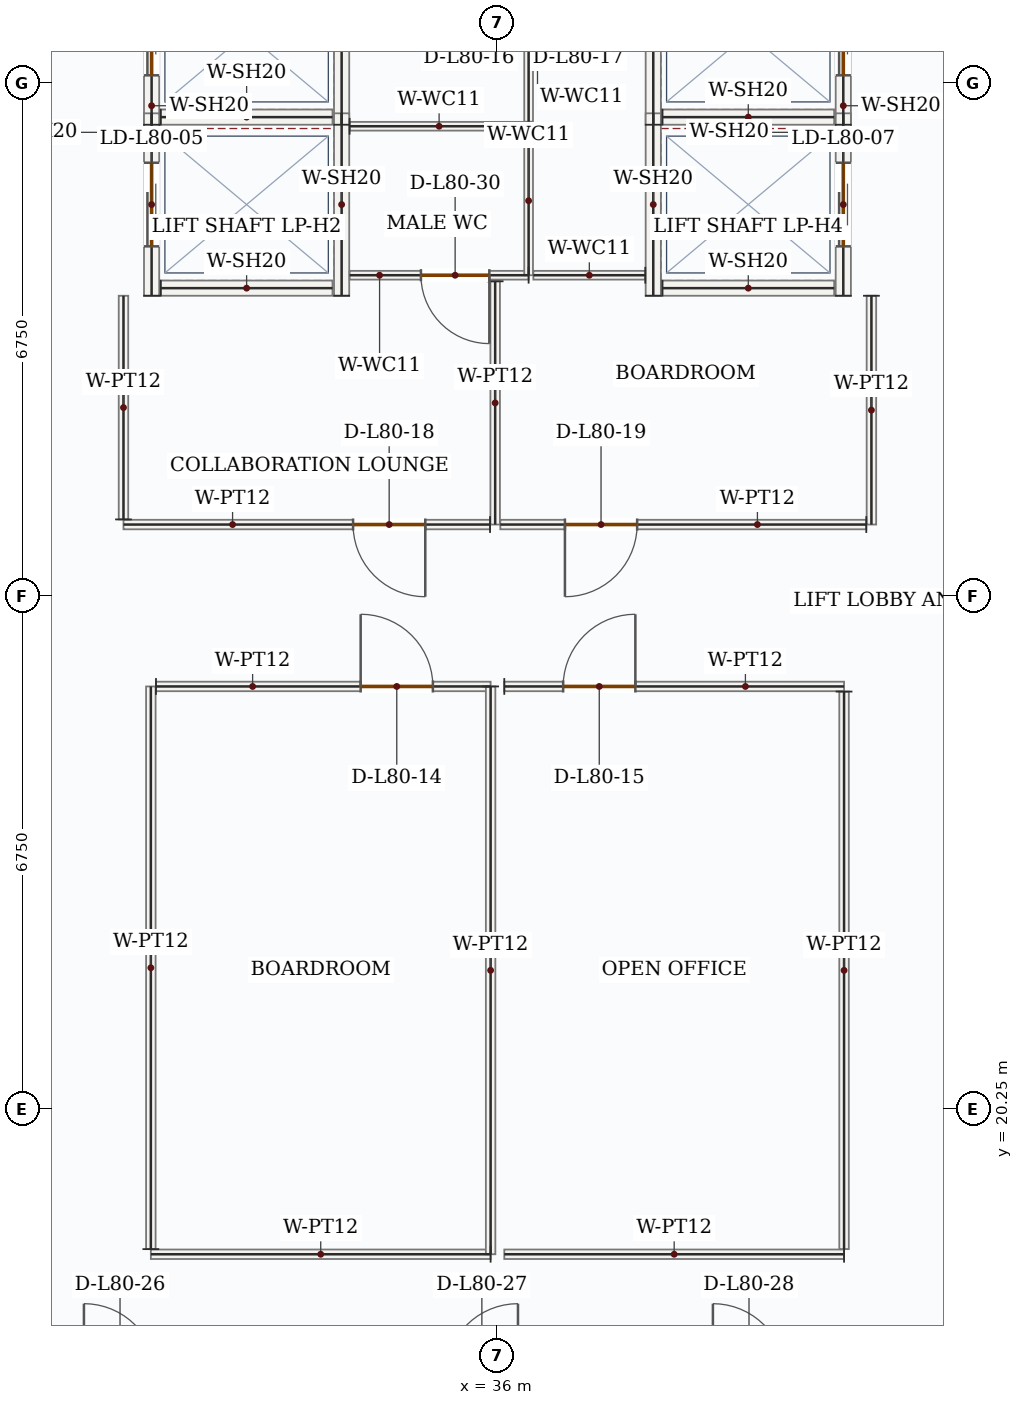
"""IFC4 building model, lengths in metres.
Left out: names, types, materials, properties, quantities, classifications, styles, units other than length and angle.
Written with IfcOpenShell. Run it as: python <this file> out.ifc"""

import sys

from ifc_helpers import new_model, si_unit, direction, frame, frame_2d, origin, place, context, subcontext, project, spatial, rectangle, extrude, source, transform, mapped, element, fill, save


model = new_model("IFC4")
c1 = context("Model", 3, precision=1e-05, world=origin(), true_north=direction((0.0, 1.0)))
c2 = subcontext(c1, "Body", "Model", "MODEL_VIEW")
j1 = project(units=[si_unit("LENGTHUNIT", "METRE"), si_unit("PLANEANGLEUNIT", "RADIAN")], contexts=[c1])
p1 = place(None, origin())
s1 = spatial("IfcSite", under=j1, at=p1, CompositionType="ELEMENT")
p2 = place(p1, origin())
s2 = spatial("IfcBuilding", under=s1, at=p2, CompositionType="ELEMENT")
p3 = place(p2, frame((0.0, 0.0, 331.05)))
s3 = spatial("IfcBuildingStorey", under=s2, at=p3, CompositionType="ELEMENT", Elevation=331.05)
p4 = place(p3, frame((31.45, 33.2, 0.0), z_axis=(0.0, 0.0, 1.0), x_axis=(0.0, 1.0, 0.0)))
e1 = element("IfcWall", 1, at=p4, inside=s3, PredefinedType="SOLIDWALL", context=c2, shape_type="SweptSolid", body=[
    extrude(rectangle(XDim=2.4, YDim=0.2, at=frame_2d((1.2, 0.0))), origin(), (0.0, 0.0, 1.0), 3.5),
])
p5 = place(p4, frame((0.65, 0.0, 0.0)))
e2 = element("IfcOpeningElement", 2, at=p5, cuts=e1, PredefinedType="OPENING", context=c2, shape_type="SweptSolid", body=[
    extrude(rectangle(XDim=1.1, YDim=2.15, at=frame_2d((0.55, 1.075))), frame((0.0, 0.11, 0.0), z_axis=(0.0, -1.0, 0.0), x_axis=(1.0, 0.0, 0.0)), (0.0, 0.0, 1.0), 0.22),
])
m1 = source(origin(), c2, "Body", "SweptSolid", [
    extrude(rectangle(XDim=2.4, YDim=0.2, at=frame_2d((1.2, 0.0))), origin(), (0.0, 0.0, 1.0), 3.5),
])
p6 = place(p3, frame((33.95, 33.2, 0.0), z_axis=(0.0, 0.0, 1.0), x_axis=(0.0, 1.0, 0.0)))
e3 = element("IfcWall", 3, at=p6, inside=s3, PredefinedType="SOLIDWALL", context=c2, shape_type="MappedRepresentation", body=[
    mapped(m1, transform((0.0, 0.0, 0.0), x_axis=(1.0, 0.0, 0.0), y_axis=(0.0, 1.0, 0.0), z_axis=(0.0, 0.0, 1.0), scale=1.0)),
])
m2 = source(origin(), c2, "Body", "SweptSolid", [
    extrude(rectangle(XDim=2.26, YDim=0.2, at=frame_2d((1.13, 0.0))), origin(), (0.0, 0.0, 1.0), 3.5),
])
p7 = place(p3, frame((31.57, 33.3, 0.0), z_axis=(0.0, 0.0, 1.0), x_axis=(1.0, 0.0, 0.0)))
e4 = element("IfcWall", 4, at=p7, inside=s3, PredefinedType="SOLIDWALL", context=c2, shape_type="MappedRepresentation", body=[
    mapped(m2, transform((0.0, 0.0, 0.0), x_axis=(1.0, 0.0, 0.0), y_axis=(0.0, 1.0, 0.0), z_axis=(0.0, 0.0, 1.0), scale=1.0)),
])
p8 = place(p3, frame((31.45, 30.95, 0.0), z_axis=(0.0, 0.0, 1.0), x_axis=(0.0, 1.0, 0.0)))
e5 = element("IfcWall", 5, at=p8, inside=s3, PredefinedType="SOLIDWALL", context=c2, shape_type="SweptSolid", body=[
    extrude(rectangle(XDim=2.4, YDim=0.2, at=frame_2d((1.2, 0.0))), origin(), (0.0, 0.0, 1.0), 3.5),
])
p9 = place(p8, frame((0.65, 0.0, 0.0)))
e6 = element("IfcOpeningElement", 6, at=p9, cuts=e5, PredefinedType="OPENING", context=c2, shape_type="SweptSolid", body=[
    extrude(rectangle(XDim=1.1, YDim=2.15, at=frame_2d((0.55, 1.075))), frame((0.0, 0.11, 0.0), z_axis=(0.0, -1.0, 0.0), x_axis=(1.0, 0.0, 0.0)), (0.0, 0.0, 1.0), 0.22),
])
p10 = place(p3, frame((33.95, 30.95, 0.0), z_axis=(0.0, 0.0, 1.0), x_axis=(0.0, 1.0, 0.0)))
e7 = element("IfcWall", 7, at=p10, inside=s3, PredefinedType="SOLIDWALL", context=c2, shape_type="MappedRepresentation", body=[
    mapped(m1, transform((0.0, 0.0, 0.0), x_axis=(1.0, 0.0, 0.0), y_axis=(0.0, 1.0, 0.0), z_axis=(0.0, 0.0, 1.0), scale=1.0)),
])
p11 = place(p3, frame((31.57, 31.05, 0.0), z_axis=(0.0, 0.0, 1.0), x_axis=(1.0, 0.0, 0.0)))
e8 = element("IfcWall", 8, at=p11, inside=s3, PredefinedType="SOLIDWALL", context=c2, shape_type="MappedRepresentation", body=[
    mapped(m2, transform((0.0, 0.0, 0.0), x_axis=(1.0, 0.0, 0.0), y_axis=(0.0, 1.0, 0.0), z_axis=(0.0, 0.0, 1.0), scale=1.0)),
])
p12 = place(p3, frame((38.05, 33.2, 0.0), z_axis=(0.0, 0.0, 1.0), x_axis=(0.0, 1.0, 0.0)))
e9 = element("IfcWall", 9, at=p12, inside=s3, PredefinedType="SOLIDWALL", context=c2, shape_type="MappedRepresentation", body=[
    mapped(m1, transform((0.0, 0.0, 0.0), x_axis=(1.0, 0.0, 0.0), y_axis=(0.0, 1.0, 0.0), z_axis=(0.0, 0.0, 1.0), scale=1.0)),
])
p13 = place(p3, frame((40.55, 33.2, 0.0), z_axis=(0.0, 0.0, 1.0), x_axis=(0.0, 1.0, 0.0)))
e10 = element("IfcWall", 10, at=p13, inside=s3, PredefinedType="SOLIDWALL", context=c2, shape_type="SweptSolid", body=[
    extrude(rectangle(XDim=2.4, YDim=0.2, at=frame_2d((1.2, 0.0))), origin(), (0.0, 0.0, 1.0), 3.5),
])
p14 = place(p13, frame((0.65, 0.0, 0.0)))
e11 = element("IfcOpeningElement", 11, at=p14, cuts=e10, PredefinedType="OPENING", context=c2, shape_type="SweptSolid", body=[
    extrude(rectangle(XDim=1.1, YDim=2.15, at=frame_2d((0.55, 1.075))), frame((0.0, 0.11, 0.0), z_axis=(0.0, -1.0, 0.0), x_axis=(1.0, 0.0, 0.0)), (0.0, 0.0, 1.0), 0.22),
])
p15 = place(p3, frame((38.17, 33.3, 0.0), z_axis=(0.0, 0.0, 1.0), x_axis=(1.0, 0.0, 0.0)))
e12 = element("IfcWall", 12, at=p15, inside=s3, PredefinedType="SOLIDWALL", context=c2, shape_type="MappedRepresentation", body=[
    mapped(m2, transform((0.0, 0.0, 0.0), x_axis=(1.0, 0.0, 0.0), y_axis=(0.0, 1.0, 0.0), z_axis=(0.0, 0.0, 1.0), scale=1.0)),
])
p16 = place(p3, frame((38.05, 30.95, 0.0), z_axis=(0.0, 0.0, 1.0), x_axis=(0.0, 1.0, 0.0)))
e13 = element("IfcWall", 13, at=p16, inside=s3, PredefinedType="SOLIDWALL", context=c2, shape_type="MappedRepresentation", body=[
    mapped(m1, transform((0.0, 0.0, 0.0), x_axis=(1.0, 0.0, 0.0), y_axis=(0.0, 1.0, 0.0), z_axis=(0.0, 0.0, 1.0), scale=1.0)),
])
p17 = place(p3, frame((40.55, 30.95, 0.0), z_axis=(0.0, 0.0, 1.0), x_axis=(0.0, 1.0, 0.0)))
e14 = element("IfcWall", 14, at=p17, inside=s3, PredefinedType="SOLIDWALL", context=c2, shape_type="SweptSolid", body=[
    extrude(rectangle(XDim=2.4, YDim=0.2, at=frame_2d((1.2, 0.0))), origin(), (0.0, 0.0, 1.0), 3.5),
])
p18 = place(p17, frame((0.65, 0.0, 0.0)))
e15 = element("IfcOpeningElement", 15, at=p18, cuts=e14, PredefinedType="OPENING", context=c2, shape_type="SweptSolid", body=[
    extrude(rectangle(XDim=1.1, YDim=2.15, at=frame_2d((0.55, 1.075))), frame((0.0, 0.11, 0.0), z_axis=(0.0, -1.0, 0.0), x_axis=(1.0, 0.0, 0.0)), (0.0, 0.0, 1.0), 0.22),
])
p19 = place(p3, frame((38.17, 31.05, 0.0), z_axis=(0.0, 0.0, 1.0), x_axis=(1.0, 0.0, 0.0)))
e16 = element("IfcWall", 16, at=p19, inside=s3, PredefinedType="SOLIDWALL", context=c2, shape_type="MappedRepresentation", body=[
    mapped(m2, transform((0.0, 0.0, 0.0), x_axis=(1.0, 0.0, 0.0), y_axis=(0.0, 1.0, 0.0), z_axis=(0.0, 0.0, 1.0), scale=1.0)),
])
p20 = place(p3, frame((36.41, 31.22, 0.0), z_axis=(0.0, 0.0, 1.0), x_axis=(-1.0, 0.0, 0.0)))
e17 = element("IfcWall", 17, at=p20, inside=s3, PredefinedType="PARTITIONING", context=c2, shape_type="SweptSolid", body=[
    extrude(rectangle(XDim=2.355, YDim=0.115, at=frame_2d((1.177, 0.0))), origin(), (0.0, 0.0, 1.0), 3.5),
])
p21 = place(p20, frame((0.517, 0.0, 0.0)))
e18 = element("IfcOpeningElement", 18, at=p21, cuts=e17, PredefinedType="OPENING", context=c2, shape_type="SweptSolid", body=[
    extrude(rectangle(XDim=0.9, YDim=2.1, at=frame_2d((0.45, 1.05))), frame((0.0, 0.067, 0.0), z_axis=(0.0, -1.0, 0.0), x_axis=(1.0, 0.0, 0.0)), (0.0, 0.0, 1.0), 0.135),
])
m3 = source(origin(), c2, "Body", "SweptSolid", [
    extrude(rectangle(XDim=2.355, YDim=0.115, at=frame_2d((1.177, 0.0))), origin(), (0.0, 0.0, 1.0), 3.5),
])
p22 = place(p3, frame((34.055, 33.18, 0.0), z_axis=(0.0, 0.0, 1.0), x_axis=(1.0, 0.0, 0.0)))
e19 = element("IfcWall", 19, at=p22, inside=s3, PredefinedType="PARTITIONING", context=c2, shape_type="MappedRepresentation", body=[
    mapped(m3, transform((0.0, 0.0, 0.0), x_axis=(1.0, 0.0, 0.0), y_axis=(0.0, 1.0, 0.0), z_axis=(0.0, 0.0, 1.0), scale=1.0)),
])
m4 = source(origin(), c2, "Body", "SweptSolid", [
    extrude(rectangle(XDim=1.96, YDim=0.115, at=frame_2d((0.98, 0.0))), origin(), (0.0, 0.0, 1.0), 3.5),
])
p23 = place(p3, frame((36.41, 33.18, 0.0), z_axis=(0.0, 0.0, 1.0), x_axis=(0.0, -1.0, 0.0)))
e20 = element("IfcWall", 20, at=p23, inside=s3, PredefinedType="PARTITIONING", context=c2, shape_type="MappedRepresentation", body=[
    mapped(m4, transform((0.0, 0.0, 0.0), x_axis=(1.0, 0.0, 0.0), y_axis=(0.0, 1.0, 0.0), z_axis=(0.0, 0.0, 1.0), scale=1.0)),
])
m5 = source(origin(), c2, "Body", "SweptSolid", [
    extrude(rectangle(XDim=2.04, YDim=0.115, at=frame_2d((1.02, 0.0))), origin(), (0.0, 0.0, 1.0), 3.5),
])
p24 = place(p3, frame((36.41, 35.28, 0.0), z_axis=(0.0, 0.0, 1.0), x_axis=(0.0, -1.0, 0.0)))
e21 = element("IfcWall", 21, at=p24, inside=s3, PredefinedType="PARTITIONING", context=c2, shape_type="MappedRepresentation", body=[
    mapped(m5, transform((0.0, 0.0, 0.0), x_axis=(1.0, 0.0, 0.0), y_axis=(0.0, 1.0, 0.0), z_axis=(0.0, 0.0, 1.0), scale=1.0)),
])
m6 = source(origin(), c2, "Body", "SweptSolid", [
    extrude(rectangle(XDim=1.473, YDim=0.115, at=frame_2d((0.736, 0.0))), origin(), (0.0, 0.0, 1.0), 3.5),
])
p25 = place(p3, frame((37.945, 31.22, 0.0), z_axis=(0.0, 0.0, 1.0), x_axis=(-1.0, 0.0, 0.0)))
e22 = element("IfcWall", 22, at=p25, inside=s3, PredefinedType="PARTITIONING", context=c2, shape_type="MappedRepresentation", body=[
    mapped(m6, transform((0.0, 0.0, 0.0), x_axis=(1.0, 0.0, 0.0), y_axis=(0.0, 1.0, 0.0), z_axis=(0.0, 0.0, 1.0), scale=1.0)),
])
m7 = source(origin(), c2, "Body", "SweptSolid", [
    extrude(rectangle(XDim=3.2, YDim=0.125, at=frame_2d((1.6, 0.0))), origin(), (0.0, 0.0, 1.0), 3.5),
])
p26 = place(p3, frame((35.97, 31.14, 0.0), z_axis=(0.0, 0.0, 1.0), x_axis=(0.0, -1.0, 0.0)))
e23 = element("IfcWall", 23, at=p26, inside=s3, PredefinedType="PARTITIONING", context=c2, shape_type="MappedRepresentation", body=[
    mapped(m7, transform((0.0, 0.0, 0.0), x_axis=(1.0, 0.0, 0.0), y_axis=(0.0, 1.0, 0.0), z_axis=(0.0, 0.0, 1.0), scale=1.0)),
])
p27 = place(p3, frame((35.903, 27.94, 0.0), z_axis=(0.0, 0.0, 1.0), x_axis=(-1.0, 0.0, 0.0)))
e24 = element("IfcWall", 24, at=p27, inside=s3, PredefinedType="PARTITIONING", context=c2, shape_type="SweptSolid", body=[
    extrude(rectangle(XDim=4.823, YDim=0.125, at=frame_2d((2.411, 0.0))), origin(), (0.0, 0.0, 1.0), 3.5),
])
p28 = place(p27, frame((0.852, 0.0, 0.0)))
e25 = element("IfcOpeningElement", 25, at=p28, cuts=e24, PredefinedType="OPENING", context=c2, shape_type="SweptSolid", body=[
    extrude(rectangle(XDim=0.95, YDim=2.15, at=frame_2d((0.475, 1.075))), frame((0.0, 0.073, 0.0), z_axis=(0.0, -1.0, 0.0), x_axis=(1.0, 0.0, 0.0)), (0.0, 0.0, 1.0), 0.145),
])
m8 = source(origin(), c2, "Body", "SweptSolid", [
    extrude(rectangle(XDim=2.942, YDim=0.125, at=frame_2d((1.471, 0.0))), origin(), (0.0, 0.0, 1.0), 3.5),
])
p29 = place(p3, frame((31.08, 28.008, 0.0), z_axis=(0.0, 0.0, 1.0), x_axis=(0.0, 1.0, 0.0)))
e26 = element("IfcWall", 26, at=p29, inside=s3, PredefinedType="PARTITIONING", context=c2, shape_type="MappedRepresentation", body=[
    mapped(m8, transform((0.0, 0.0, 0.0), x_axis=(1.0, 0.0, 0.0), y_axis=(0.0, 1.0, 0.0), z_axis=(0.0, 0.0, 1.0), scale=1.0)),
])
m9 = source(origin(), c2, "Body", "SweptSolid", [
    extrude(rectangle(XDim=3.01, YDim=0.125, at=frame_2d((1.505, 0.0))), origin(), (0.0, 0.0, 1.0), 3.5),
])
p30 = place(p3, frame((40.92, 30.95, 0.0), z_axis=(0.0, 0.0, 1.0), x_axis=(0.0, -1.0, 0.0)))
e27 = element("IfcWall", 27, at=p30, inside=s3, PredefinedType="PARTITIONING", context=c2, shape_type="MappedRepresentation", body=[
    mapped(m9, transform((0.0, 0.0, 0.0), x_axis=(1.0, 0.0, 0.0), y_axis=(0.0, 1.0, 0.0), z_axis=(0.0, 0.0, 1.0), scale=1.0)),
])
p31 = place(p3, frame((40.853, 27.94, 0.0), z_axis=(0.0, 0.0, 1.0), x_axis=(-1.0, 0.0, 0.0)))
e28 = element("IfcWall", 28, at=p31, inside=s3, PredefinedType="PARTITIONING", context=c2, shape_type="SweptSolid", body=[
    extrude(rectangle(XDim=4.815, YDim=0.125, at=frame_2d((2.407, 0.0))), origin(), (0.0, 0.0, 1.0), 3.5),
])
p32 = place(p31, frame((3.015, 0.0, 0.0)))
e29 = element("IfcOpeningElement", 29, at=p32, cuts=e28, PredefinedType="OPENING", context=c2, shape_type="SweptSolid", body=[
    extrude(rectangle(XDim=0.95, YDim=2.15, at=frame_2d((0.475, 1.075))), frame((0.0, 0.073, 0.0), z_axis=(0.0, -1.0, 0.0), x_axis=(1.0, 0.0, 0.0)), (0.0, 0.0, 1.0), 0.145),
])
m10 = source(origin(), c2, "Body", "SweptSolid", [
    extrude(rectangle(XDim=4.47, YDim=0.125, at=frame_2d((2.235, 0.0))), origin(), (0.0, 0.0, 1.0), 3.5),
])
p33 = place(p3, frame((35.91, 18.34, 0.0), z_axis=(0.0, 0.0, 1.0), x_axis=(-1.0, 0.0, 0.0)))
e30 = element("IfcWall", 30, at=p33, inside=s3, PredefinedType="PARTITIONING", context=c2, shape_type="MappedRepresentation", body=[
    mapped(m10, transform((0.0, 0.0, 0.0), x_axis=(1.0, 0.0, 0.0), y_axis=(0.0, 1.0, 0.0), z_axis=(0.0, 0.0, 1.0), scale=1.0)),
])
m11 = source(origin(), c2, "Body", "SweptSolid", [
    extrude(rectangle(XDim=7.403, YDim=0.125, at=frame_2d((3.701, 0.0))), origin(), (0.0, 0.0, 1.0), 3.5),
])
p34 = place(p3, frame((31.44, 18.407, 0.0), z_axis=(0.0, 0.0, 1.0), x_axis=(0.0, 1.0, 0.0)))
e31 = element("IfcWall", 31, at=p34, inside=s3, PredefinedType="PARTITIONING", context=c2, shape_type="MappedRepresentation", body=[
    mapped(m11, transform((0.0, 0.0, 0.0), x_axis=(1.0, 0.0, 0.0), y_axis=(0.0, 1.0, 0.0), z_axis=(0.0, 0.0, 1.0), scale=1.0)),
])
p35 = place(p3, frame((31.508, 25.81, 0.0), z_axis=(0.0, 0.0, 1.0), x_axis=(1.0, 0.0, 0.0)))
e32 = element("IfcWall", 32, at=p35, inside=s3, PredefinedType="PARTITIONING", context=c2, shape_type="SweptSolid", body=[
    extrude(rectangle(XDim=4.402, YDim=0.125, at=frame_2d((2.201, 0.0))), origin(), (0.0, 0.0, 1.0), 3.5),
])
p36 = place(p35, frame((2.693, 0.0, 0.0)))
e33 = element("IfcOpeningElement", 33, at=p36, cuts=e32, PredefinedType="OPENING", context=c2, shape_type="SweptSolid", body=[
    extrude(rectangle(XDim=0.95, YDim=2.15, at=frame_2d((0.475, 1.075))), frame((0.0, 0.073, 0.0), z_axis=(0.0, -1.0, 0.0), x_axis=(1.0, 0.0, 0.0)), (0.0, 0.0, 1.0), 0.145),
])
m12 = source(origin(), c2, "Body", "SweptSolid", [
    extrude(rectangle(XDim=7.47, YDim=0.125, at=frame_2d((3.735, 0.0))), origin(), (0.0, 0.0, 1.0), 3.5),
])
p37 = place(p3, frame((35.91, 25.81, 0.0), z_axis=(0.0, 0.0, 1.0), x_axis=(0.0, -1.0, 0.0)))
e34 = element("IfcWall", 34, at=p37, inside=s3, PredefinedType="PARTITIONING", context=c2, shape_type="MappedRepresentation", body=[
    mapped(m12, transform((0.0, 0.0, 0.0), x_axis=(1.0, 0.0, 0.0), y_axis=(0.0, 1.0, 0.0), z_axis=(0.0, 0.0, 1.0), scale=1.0)),
])
p38 = place(p3, frame((40.56, 18.34, 0.0), z_axis=(0.0, 0.0, 1.0), x_axis=(-1.0, 0.0, 0.0)))
e35 = element("IfcWall", 35, at=p38, inside=s3, PredefinedType="PARTITIONING", context=c2, shape_type="MappedRepresentation", body=[
    mapped(m10, transform((0.0, 0.0, 0.0), x_axis=(1.0, 0.0, 0.0), y_axis=(0.0, 1.0, 0.0), z_axis=(0.0, 0.0, 1.0), scale=1.0)),
])
p39 = place(p3, frame((36.09, 25.81, 0.0), z_axis=(0.0, 0.0, 1.0), x_axis=(1.0, 0.0, 0.0)))
e36 = element("IfcWall", 36, at=p39, inside=s3, PredefinedType="PARTITIONING", context=c2, shape_type="SweptSolid", body=[
    extrude(rectangle(XDim=4.47, YDim=0.125, at=frame_2d((2.235, 0.0))), origin(), (0.0, 0.0, 1.0), 3.5),
])
p40 = place(p39, frame((0.774, 0.0, 0.0)))
e37 = element("IfcOpeningElement", 37, at=p40, cuts=e36, PredefinedType="OPENING", context=c2, shape_type="SweptSolid", body=[
    extrude(rectangle(XDim=0.95, YDim=2.15, at=frame_2d((0.475, 1.075))), frame((0.0, 0.073, 0.0), z_axis=(0.0, -1.0, 0.0), x_axis=(1.0, 0.0, 0.0)), (0.0, 0.0, 1.0), 0.145),
])
m13 = source(origin(), c2, "Body", "SweptSolid", [
    extrude(rectangle(XDim=7.335, YDim=0.125, at=frame_2d((3.667, 0.0))), origin(), (0.0, 0.0, 1.0), 3.5),
])
p41 = place(p3, frame((40.56, 25.742, 0.0), z_axis=(0.0, 0.0, 1.0), x_axis=(0.0, -1.0, 0.0)))
e38 = element("IfcWall", 38, at=p41, inside=s3, PredefinedType="PARTITIONING", context=c2, shape_type="MappedRepresentation", body=[
    mapped(m13, transform((0.0, 0.0, 0.0), x_axis=(1.0, 0.0, 0.0), y_axis=(0.0, 1.0, 0.0), z_axis=(0.0, 0.0, 1.0), scale=1.0)),
])
m14 = source(origin(), c2, "Body", "SweptSolid", [
    extrude(rectangle(XDim=1.1, YDim=2.15, at=frame_2d((0.55, 1.075))), frame((0.0, 0.025, 0.0), z_axis=(0.0, -1.0, 0.0), x_axis=(1.0, 0.0, 0.0)), (0.0, 0.0, 1.0), 0.05),
])
p42 = place(p5, origin())
e39 = element("IfcDoor", 39, at=p42, inside=s3, OperationType="DOUBLE_DOOR_SLIDING", PredefinedType="DOOR", context=c2, shape_type="MappedRepresentation", body=[
    mapped(m14, transform((0.0, 0.0, 0.0), x_axis=(1.0, 0.0, 0.0), y_axis=(0.0, 1.0, 0.0), z_axis=(0.0, 0.0, 1.0), scale=1.0)),
])
fill(e2, e39)
p43 = place(p9, origin())
e40 = element("IfcDoor", 40, at=p43, inside=s3, OperationType="DOUBLE_DOOR_SLIDING", PredefinedType="DOOR", context=c2, shape_type="MappedRepresentation", body=[
    mapped(m14, transform((0.0, 0.0, 0.0), x_axis=(1.0, 0.0, 0.0), y_axis=(0.0, 1.0, 0.0), z_axis=(0.0, 0.0, 1.0), scale=1.0)),
])
fill(e6, e40)
p44 = place(p14, origin())
e41 = element("IfcDoor", 41, at=p44, inside=s3, OperationType="DOUBLE_DOOR_SLIDING", PredefinedType="DOOR", context=c2, shape_type="MappedRepresentation", body=[
    mapped(m14, transform((0.0, 0.0, 0.0), x_axis=(1.0, 0.0, 0.0), y_axis=(0.0, 1.0, 0.0), z_axis=(0.0, 0.0, 1.0), scale=1.0)),
])
fill(e11, e41)
p45 = place(p18, origin())
e42 = element("IfcDoor", 42, at=p45, inside=s3, OperationType="DOUBLE_DOOR_SLIDING", PredefinedType="DOOR", context=c2, shape_type="MappedRepresentation", body=[
    mapped(m14, transform((0.0, 0.0, 0.0), x_axis=(1.0, 0.0, 0.0), y_axis=(0.0, 1.0, 0.0), z_axis=(0.0, 0.0, 1.0), scale=1.0)),
])
fill(e15, e42)
m15 = source(origin(), c2, "Body", "SweptSolid", [
    extrude(rectangle(XDim=0.95, YDim=2.15, at=frame_2d((0.475, 1.075))), frame((0.0, 0.025, 0.0), z_axis=(0.0, -1.0, 0.0), x_axis=(1.0, 0.0, 0.0)), (0.0, 0.0, 1.0), 0.05),
])
p46 = place(p36, origin())
e43 = element("IfcDoor", 43, at=p46, inside=s3, OperationType="SINGLE_SWING_LEFT", PredefinedType="DOOR", context=c2, shape_type="MappedRepresentation", body=[
    mapped(m15, transform((0.0, 0.0, 0.0), x_axis=(1.0, 0.0, 0.0), y_axis=(0.0, 1.0, 0.0), z_axis=(0.0, 0.0, 1.0), scale=1.0)),
])
fill(e33, e43)
p47 = place(p40, origin())
e44 = element("IfcDoor", 44, at=p47, inside=s3, OperationType="SINGLE_SWING_RIGHT", PredefinedType="DOOR", context=c2, shape_type="MappedRepresentation", body=[
    mapped(m15, transform((0.0, 0.0, 0.0), x_axis=(1.0, 0.0, 0.0), y_axis=(0.0, 1.0, 0.0), z_axis=(0.0, 0.0, 1.0), scale=1.0)),
])
fill(e37, e44)
p48 = place(p28, origin())
e45 = element("IfcDoor", 45, at=p48, inside=s3, OperationType="SINGLE_SWING_LEFT", PredefinedType="DOOR", context=c2, shape_type="MappedRepresentation", body=[
    mapped(m15, transform((0.0, 0.0, 0.0), x_axis=(1.0, 0.0, 0.0), y_axis=(0.0, 1.0, 0.0), z_axis=(0.0, 0.0, 1.0), scale=1.0)),
])
fill(e25, e45)
p49 = place(p32, origin())
e46 = element("IfcDoor", 46, at=p49, inside=s3, OperationType="SINGLE_SWING_RIGHT", PredefinedType="DOOR", context=c2, shape_type="MappedRepresentation", body=[
    mapped(m15, transform((0.0, 0.0, 0.0), x_axis=(1.0, 0.0, 0.0), y_axis=(0.0, 1.0, 0.0), z_axis=(0.0, 0.0, 1.0), scale=1.0)),
])
fill(e29, e46)
m16 = source(origin(), c2, "Body", "SweptSolid", [
    extrude(rectangle(XDim=0.9, YDim=2.1, at=frame_2d((0.45, 1.05))), frame((0.0, 0.025, 0.0), z_axis=(0.0, -1.0, 0.0), x_axis=(1.0, 0.0, 0.0)), (0.0, 0.0, 1.0), 0.05),
])
p50 = place(p21, origin())
e47 = element("IfcDoor", 47, at=p50, inside=s3, OperationType="SINGLE_SWING_LEFT", PredefinedType="DOOR", context=c2, shape_type="MappedRepresentation", body=[
    mapped(m16, transform((0.0, 0.0, 0.0), x_axis=(1.0, 0.0, 0.0), y_axis=(0.0, 1.0, 0.0), z_axis=(0.0, 0.0, 1.0), scale=1.0)),
])
fill(e18, e47)
save(model, sys.argv[1])
